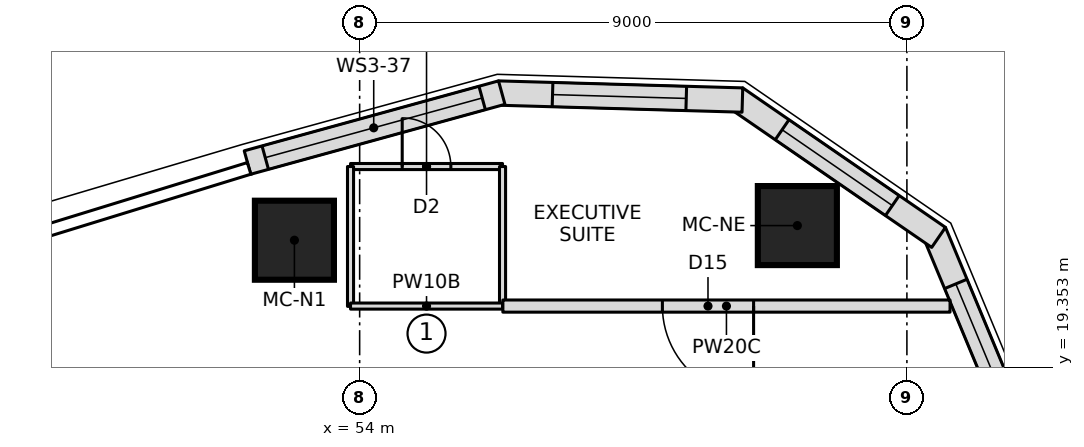
"""IFC4 building model, lengths in metres.
Left out: names, types, materials, properties, quantities, classifications, styles, units other than length and angle.
Written with IfcOpenShell. Run it as: python <this file> out.ifc"""

import sys

from ifc_helpers import new_model, si_unit, direction, frame, frame_2d, origin, origin_2d, place, context, subcontext, project, spatial, polyline, rectangle, outline, extrude, element, fill, save


model = new_model("IFC4")
c1 = context("Model", 3, precision=1e-05, world=origin(), true_north=direction((0.0, 1.0)))
c2 = subcontext(c1, "Body", "Model", "MODEL_VIEW")
j1 = project(units=[si_unit("LENGTHUNIT", "METRE"), si_unit("PLANEANGLEUNIT", "RADIAN")], contexts=[c1])
p1 = place(None, origin())
s1 = spatial("IfcSite", under=j1, at=p1, CompositionType="ELEMENT")
p2 = place(p1, origin())
s2 = spatial("IfcBuilding", under=s1, at=p2, CompositionType="ELEMENT")
p3 = place(p2, frame((0.0, 0.0, 203.9)))
s3 = spatial("IfcBuildingStorey", under=s2, at=p3, CompositionType="ELEMENT", Elevation=203.9)
for number, where, z_axis, x_axis in (
    (1, (61.198, 21.679, 0.0), (0.0, 0.0, 1.0), (1.0, 0.0, 0.0)),
    (2, (52.927, 21.438, 0.0), (0.0, 0.0, 1.0), (1.0, 0.0, 0.0)),
):
    element("IfcColumn", number, at=place(p3, frame(where, z_axis=z_axis, x_axis=x_axis)), inside=s3, PredefinedType="COLUMN", context=c2, shape_type="SweptSolid", body=[
        extrude(rectangle(XDim=1.3, YDim=1.3, at=origin_2d()), origin(), (0.0, 0.0, 1.0), 3.55),
    ])
p4 = place(p3, frame((64.981, 17.89, 0.0), z_axis=(0.0, 0.0, 1.0), x_axis=(-0.383997619794, 0.923334082547, 0.0)))
e3 = element("IfcWall", 3, at=p4, inside=s3, PredefinedType="NOTDEFINED", context=c2, shape_type="SweptSolid", body=[
    extrude(outline(polyline([(-0.03, -0.2), (3.988, -0.2), (3.87, 0.2), (0.03, 0.2), (-0.03, -0.2)])), origin(), (0.0, 0.0, 1.0), 3.25),
])
p5 = place(p4, frame((0.865, 0.0, 0.6)))
e4 = element("IfcOpeningElement", 4, at=p5, cuts=e3, PredefinedType="OPENING", context=c2, shape_type="SweptSolid", body=[
    extrude(outline(polyline([(0.0, 1.35), (0.084, 1.771), (0.322, 2.128), (0.679, 2.366), (1.1, 2.45), (1.521, 2.366), (1.878, 2.128), (2.116, 1.771), (2.2, 1.35), (2.2, 1.1), (2.116, 0.679), (1.878, 0.322), (1.521, 0.084), (1.1, 0.0), (0.679, 0.084), (0.322, 0.322), (0.084, 0.679), (0.0, 1.1), (0.0, 1.35)])), frame((0.0, 0.21, 0.0), z_axis=(0.0, -1.0, 0.0), x_axis=(1.0, 0.0, 0.0)), (0.0, 0.0, 1.0), 0.42),
])
p6 = place(p3, frame((63.472, 21.518, 0.0), z_axis=(0.0, 0.0, 1.0), x_axis=(-0.823806162588, 0.566871596115, 0.0)))
e5 = element("IfcWall", 5, at=p6, inside=s3, PredefinedType="NOTDEFINED", context=c2, shape_type="SweptSolid", body=[
    extrude(outline(polyline([(-0.059, -0.2), (3.988, -0.2), (3.87, 0.2), (0.059, 0.2), (-0.059, -0.2)])), origin(), (0.0, 0.0, 1.0), 3.25),
])
p7 = place(p6, frame((0.865, 0.0, 0.6)))
e6 = element("IfcOpeningElement", 6, at=p7, cuts=e5, PredefinedType="OPENING", context=c2, shape_type="SweptSolid", body=[
    extrude(outline(polyline([(0.0, 1.35), (0.084, 1.771), (0.322, 2.128), (0.679, 2.366), (1.1, 2.45), (1.521, 2.366), (1.878, 2.128), (2.116, 1.771), (2.2, 1.35), (2.2, 1.1), (2.116, 0.679), (1.878, 0.322), (1.521, 0.084), (1.1, 0.0), (0.679, 0.084), (0.322, 0.322), (0.084, 0.679), (0.0, 1.1), (0.0, 1.35)])), frame((0.0, 0.21, 0.0), z_axis=(0.0, -1.0, 0.0), x_axis=(1.0, 0.0, 0.0)), (0.0, 0.0, 1.0), 0.42),
])
p8 = place(p3, frame((60.236, 23.745, 0.0), z_axis=(0.0, 0.0, 1.0), x_axis=(-0.999587920197, 0.028705222472, 0.0)))
e7 = element("IfcWall", 7, at=p8, inside=s3, PredefinedType="NOTDEFINED", context=c2, shape_type="SweptSolid", body=[
    extrude(outline(polyline([(-0.059, -0.2), (3.959, -0.2), (3.9, 0.2), (0.059, 0.2), (-0.059, -0.2)])), origin(), (0.0, 0.0, 1.0), 3.25),
])
p9 = place(p8, frame((0.865, 0.0, 0.6)))
e8 = element("IfcOpeningElement", 8, at=p9, cuts=e7, PredefinedType="OPENING", context=c2, shape_type="SweptSolid", body=[
    extrude(outline(polyline([(0.0, 1.35), (0.084, 1.771), (0.322, 2.128), (0.679, 2.366), (1.1, 2.45), (1.521, 2.366), (1.878, 2.128), (2.116, 1.771), (2.2, 1.35), (2.2, 1.1), (2.116, 0.679), (1.878, 0.322), (1.521, 0.084), (1.1, 0.0), (0.679, 0.084), (0.322, 0.322), (0.084, 0.679), (0.0, 1.1), (0.0, 1.35)])), frame((0.0, 0.21, 0.0), z_axis=(0.0, -1.0, 0.0), x_axis=(1.0, 0.0, 0.0)), (0.0, 0.0, 1.0), 0.42),
])
p10 = place(p3, frame((56.308, 23.858, 0.0), z_axis=(0.0, 0.0, 1.0), x_axis=(-0.964205755089, -0.265155165617, 0.0)))
e9 = element("IfcWall", 9, at=p10, inside=s3, PredefinedType="NOTDEFINED", context=c2, shape_type="SweptSolid", body=[
    extrude(outline(polyline([(-0.03, -0.2), (4.307, -0.2), (4.307, 0.2), (0.03, 0.2), (-0.03, -0.2)])), origin(), (0.0, 0.0, 1.0), 3.25),
])
p11 = place(p10, frame((0.303, 0.0, 0.9)))
e10 = element("IfcOpeningElement", 10, at=p11, cuts=e9, PredefinedType="OPENING", context=c2, shape_type="SweptSolid", body=[
    extrude(rectangle(XDim=3.7, YDim=1.8, at=frame_2d((1.85, 0.9))), frame((0.0, 0.21, 0.0), z_axis=(0.0, -1.0, 0.0), x_axis=(1.0, 0.0, 0.0)), (0.0, 0.0, 1.0), 0.42),
])
p12 = place(p3, frame((53.85, 22.65, 0.0), z_axis=(0.0, 0.0, 1.0), x_axis=(1.0, 0.0, 0.0)))
e11 = element("IfcWall", 11, at=p12, inside=s3, PredefinedType="PARTITIONING", context=c2, shape_type="SweptSolid", body=[
    extrude(rectangle(XDim=2.5, YDim=0.1, at=frame_2d((1.25, 0.0))), origin(), (0.0, 0.0, 1.0), 3.25),
])
p13 = place(p12, frame((0.85, 0.0, 0.0)))
e12 = element("IfcOpeningElement", 12, at=p13, cuts=e11, PredefinedType="OPENING", context=c2, shape_type="SweptSolid", body=[
    extrude(rectangle(XDim=0.8, YDim=2.1, at=frame_2d((0.4, 1.05))), frame((0.0, 0.06, 0.0), z_axis=(0.0, -1.0, 0.0), x_axis=(1.0, 0.0, 0.0)), (0.0, 0.0, 1.0), 0.12),
])
for number, where, z_axis, x_axis in (
    (13, (56.35, 22.65, 0.0), (0.0, 0.0, 1.0), (0.0, -1.0, 0.0)),
    (14, (53.85, 20.35, 0.0), (0.0, 0.0, 1.0), (0.0, 1.0, 0.0)),
):
    element("IfcWall", number, at=place(p3, frame(where, z_axis=z_axis, x_axis=x_axis)), inside=s3, PredefinedType="PARTITIONING", context=c2, shape_type="SweptSolid", body=[
        extrude(rectangle(XDim=2.3, YDim=0.1, at=frame_2d((1.15, 0.0))), origin(), (0.0, 0.0, 1.0), 3.25),
    ])
p14 = place(p3, frame((63.709, 20.355, 0.0), z_axis=(0.0, 0.0, 1.0), x_axis=(-1.0, 0.0, 0.0)))
e15 = element("IfcWall", 15, at=p14, inside=s3, PredefinedType="PARTITIONING", context=c2, shape_type="SweptSolid", body=[
    extrude(rectangle(XDim=7.354, YDim=0.2, at=frame_2d((3.677, 0.0))), origin(), (0.0, 0.0, 1.0), 3.25),
])
p15 = place(p14, frame((3.231, 0.0, 0.0)))
e16 = element("IfcOpeningElement", 16, at=p15, cuts=e15, PredefinedType="OPENING", context=c2, shape_type="SweptSolid", body=[
    extrude(rectangle(XDim=1.5, YDim=2.1, at=frame_2d((0.75, 1.05))), frame((0.0, 0.11, 0.0), z_axis=(0.0, -1.0, 0.0), x_axis=(1.0, 0.0, 0.0)), (0.0, 0.0, 1.0), 0.22),
])
p16 = place(p3, frame((56.35, 20.355, 0.0), z_axis=(0.0, 0.0, 1.0), x_axis=(-1.0, 0.0, 0.0)))
e17 = element("IfcWall", 17, at=p16, inside=s3, PredefinedType="PARTITIONING", context=c2, shape_type="SweptSolid", body=[
    extrude(rectangle(XDim=2.5, YDim=0.1, at=frame_2d((1.25, 0.0))), origin(), (0.0, 0.0, 1.0), 3.25),
])
p17 = place(p5, origin())
e18 = element("IfcWindow", 18, at=p17, inside=s3, PartitioningType="SINGLE_PANEL", PredefinedType="WINDOW", context=c2, shape_type="SweptSolid", body=[
    extrude(outline(polyline([(0.0, 1.35), (0.084, 1.771), (0.322, 2.128), (0.679, 2.366), (1.1, 2.45), (1.521, 2.366), (1.878, 2.128), (2.116, 1.771), (2.2, 1.35), (2.2, 1.1), (2.116, 0.679), (1.878, 0.322), (1.521, 0.084), (1.1, 0.0), (0.679, 0.084), (0.322, 0.322), (0.084, 0.679), (0.0, 1.1), (0.0, 1.35)])), frame((0.0, 0.17, 0.0), z_axis=(0.0, -1.0, 0.0), x_axis=(1.0, 0.0, 0.0)), (0.0, 0.0, 1.0), 0.06),
])
fill(e4, e18)
p18 = place(p7, origin())
e19 = element("IfcWindow", 19, at=p18, inside=s3, PartitioningType="SINGLE_PANEL", PredefinedType="WINDOW", context=c2, shape_type="SweptSolid", body=[
    extrude(outline(polyline([(0.0, 1.35), (0.084, 1.771), (0.322, 2.128), (0.679, 2.366), (1.1, 2.45), (1.521, 2.366), (1.878, 2.128), (2.116, 1.771), (2.2, 1.35), (2.2, 1.1), (2.116, 0.679), (1.878, 0.322), (1.521, 0.084), (1.1, 0.0), (0.679, 0.084), (0.322, 0.322), (0.084, 0.679), (0.0, 1.1), (0.0, 1.35)])), frame((0.0, 0.17, 0.0), z_axis=(0.0, -1.0, 0.0), x_axis=(1.0, 0.0, 0.0)), (0.0, 0.0, 1.0), 0.06),
])
fill(e6, e19)
p19 = place(p9, origin())
e20 = element("IfcWindow", 20, at=p19, inside=s3, PartitioningType="SINGLE_PANEL", PredefinedType="WINDOW", context=c2, shape_type="SweptSolid", body=[
    extrude(outline(polyline([(0.0, 1.35), (0.084, 1.771), (0.322, 2.128), (0.679, 2.366), (1.1, 2.45), (1.521, 2.366), (1.878, 2.128), (2.116, 1.771), (2.2, 1.35), (2.2, 1.1), (2.116, 0.679), (1.878, 0.322), (1.521, 0.084), (1.1, 0.0), (0.679, 0.084), (0.322, 0.322), (0.084, 0.679), (0.0, 1.1), (0.0, 1.35)])), frame((0.0, 0.17, 0.0), z_axis=(0.0, -1.0, 0.0), x_axis=(1.0, 0.0, 0.0)), (0.0, 0.0, 1.0), 0.06),
])
fill(e8, e20)
p20 = place(p11, origin())
e21 = element("IfcWindow", 21, at=p20, inside=s3, PartitioningType="SINGLE_PANEL", PredefinedType="WINDOW", context=c2, shape_type="SweptSolid", body=[
    extrude(rectangle(XDim=3.7, YDim=1.8, at=frame_2d((1.85, 0.9))), frame((0.0, 0.17, 0.0), z_axis=(0.0, -1.0, 0.0), x_axis=(1.0, 0.0, 0.0)), (0.0, 0.0, 1.0), 0.06),
])
fill(e10, e21)
p21 = place(p13, origin())
e22 = element("IfcDoor", 22, at=p21, inside=s3, OperationType="SINGLE_SWING_LEFT", PredefinedType="DOOR", context=c2, shape_type="SweptSolid", body=[
    extrude(rectangle(XDim=0.8, YDim=2.1, at=frame_2d((0.4, 1.05))), frame((0.0, 0.025, 0.0), z_axis=(0.0, -1.0, 0.0), x_axis=(1.0, 0.0, 0.0)), (0.0, 0.0, 1.0), 0.05),
])
fill(e12, e22)
p22 = place(p15, origin())
e23 = element("IfcDoor", 23, at=p22, inside=s3, OperationType="DOUBLE_DOOR_SINGLE_SWING", PredefinedType="DOOR", context=c2, shape_type="SweptSolid", body=[
    extrude(rectangle(XDim=1.5, YDim=2.1, at=frame_2d((0.75, 1.05))), frame((0.0, 0.025, 0.0), z_axis=(0.0, -1.0, 0.0), x_axis=(1.0, 0.0, 0.0)), (0.0, 0.0, 1.0), 0.05),
])
fill(e16, e23)
save(model, sys.argv[1])
